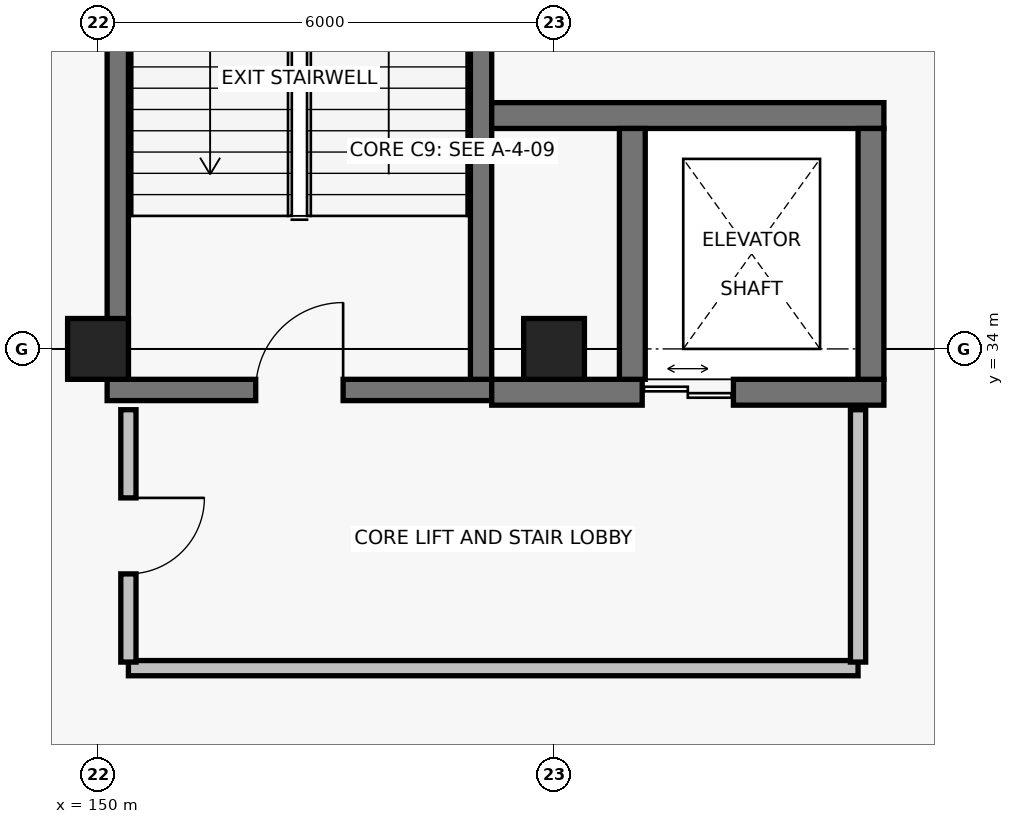
"""IFC4 building model, lengths in metres.
Left out: names, types, materials, properties, quantities, classifications, styles, units other than length and angle.
Written with IfcOpenShell. Run it as: python <this file> out.ifc"""

import sys

from ifc_helpers import new_model, si_unit, direction, frame, frame_2d, origin, origin_2d, place, context, subcontext, project, spatial, rectangle, extrude, element, fill, save


model = new_model("IFC4")
c1 = context("Model", 3, precision=1e-05, world=origin(), true_north=direction((0.0, 1.0)))
c2 = subcontext(c1, "Body", "Model", "MODEL_VIEW")
j1 = project(units=[si_unit("LENGTHUNIT", "METRE"), si_unit("PLANEANGLEUNIT", "RADIAN")], contexts=[c1])
p1 = place(None, origin())
s1 = spatial("IfcSite", under=j1, at=p1, CompositionType="ELEMENT")
p2 = place(p1, origin())
s2 = spatial("IfcBuilding", under=s1, at=p2, CompositionType="ELEMENT")
p3 = place(p2, frame((0.0, 0.0, -4.8)))
s3 = spatial("IfcBuildingStorey", under=s2, at=p3, CompositionType="ELEMENT", Elevation=-4.8)
for number, where, z_axis, x_axis in (
    (1, (150.0, 34.0, 0.0), (0.0, 0.0, 1.0), (1.0, 0.0, 0.0)),
    (2, (156.0, 34.0, 0.0), (0.0, 0.0, 1.0), (1.0, 0.0, 0.0)),
):
    element("IfcColumn", number, at=place(p3, frame(where, z_axis=z_axis, x_axis=x_axis)), inside=s3, PredefinedType="COLUMN", context=c2, shape_type="SweptSolid", body=[
        extrude(rectangle(XDim=0.8, YDim=0.8, at=origin_2d()), origin(), (0.0, 0.0, 1.0), 4.8),
    ])
p4 = place(p3, frame((150.12, 33.46, 0.0), z_axis=(0.0, 0.0, 1.0), x_axis=(1.0, 0.0, 0.0)))
e3 = element("IfcWall", 3, at=p4, inside=s3, PredefinedType="SHEAR", context=c2, shape_type="SweptSolid", body=[
    extrude(rectangle(XDim=5.06, YDim=0.28, at=frame_2d((2.53, 0.0))), origin(), (0.0, 0.0, 1.0), 4.4),
])
p5 = place(p4, frame((1.955, 0.0, 0.0)))
e4 = element("IfcOpeningElement", 4, at=p5, cuts=e3, PredefinedType="OPENING", context=c2, shape_type="SweptSolid", body=[
    extrude(rectangle(XDim=1.15, YDim=2.15, at=frame_2d((0.575, 1.075))), frame((0.0, 0.155, 0.0), z_axis=(0.0, -1.0, 0.0), x_axis=(1.0, 0.0, 0.0)), (0.0, 0.0, 1.0), 0.31),
])
for number, where, z_axis, x_axis in (
    (5, (150.26, 43.4, 0.0), (0.0, 0.0, 1.0), (0.0, -1.0, 0.0)),
    (6, (155.04, 33.6, 0.0), (0.0, 0.0, 1.0), (0.0, 1.0, 0.0)),
):
    element("IfcWall", number, at=place(p3, frame(where, z_axis=z_axis, x_axis=x_axis)), inside=s3, PredefinedType="SHEAR", context=c2, shape_type="SweptSolid", body=[
        extrude(rectangle(XDim=9.8, YDim=0.28, at=frame_2d((4.9, 0.0))), origin(), (0.0, 0.0, 1.0), 4.4),
    ])
p6 = place(p3, frame((155.18, 33.43, 0.0), z_axis=(0.0, 0.0, 1.0), x_axis=(1.0, 0.0, 0.0)))
e7 = element("IfcWall", 7, at=p6, inside=s3, PredefinedType="SHEAR", context=c2, shape_type="SweptSolid", body=[
    extrude(rectangle(XDim=5.16, YDim=0.34, at=frame_2d((2.58, 0.0))), origin(), (0.0, 0.0, 1.0), 4.4),
])
p7 = place(p6, frame((1.98, 0.0, 0.0)))
e8 = element("IfcOpeningElement", 8, at=p7, cuts=e7, PredefinedType="OPENING", context=c2, shape_type="SweptSolid", body=[
    extrude(rectangle(XDim=1.2, YDim=2.2, at=frame_2d((0.6, 1.1))), frame((0.0, 0.185, 0.0), z_axis=(0.0, -1.0, 0.0), x_axis=(1.0, 0.0, 0.0)), (0.0, 0.0, 1.0), 0.37),
])
p8 = place(p3, frame((160.34, 37.07, 0.0), z_axis=(0.0, 0.0, 1.0), x_axis=(-1.0, 0.0, 0.0)))
e9 = element("IfcWall", 9, at=p8, inside=s3, PredefinedType="SHEAR", context=c2, shape_type="SweptSolid", body=[
    extrude(rectangle(XDim=5.16, YDim=0.34, at=frame_2d((2.58, 0.0))), origin(), (0.0, 0.0, 1.0), 4.4),
])
for number, where, z_axis, x_axis in (
    (10, (157.03, 36.9, 0.0), (0.0, 0.0, 1.0), (0.0, -1.0, 0.0)),
    (11, (160.17, 33.6, 0.0), (0.0, 0.0, 1.0), (0.0, 1.0, 0.0)),
):
    element("IfcWall", number, at=place(p3, frame(where, z_axis=z_axis, x_axis=x_axis)), inside=s3, PredefinedType="SHEAR", context=c2, shape_type="SweptSolid", body=[
        extrude(rectangle(XDim=3.3, YDim=0.34, at=frame_2d((1.65, 0.0))), origin(), (0.0, 0.0, 1.0), 4.4),
    ])
p9 = place(p3, frame((150.4, 29.8, 0.0), z_axis=(0.0, 0.0, 1.0), x_axis=(1.0, 0.0, 0.0)))
e12 = element("IfcWall", 12, at=p9, inside=s3, PredefinedType="PARTITIONING", context=c2, shape_type="SweptSolid", body=[
    extrude(rectangle(XDim=9.6, YDim=0.2, at=frame_2d((4.8, 0.0))), origin(), (0.0, 0.0, 1.0), 3.741),
])
p10 = place(p3, frame((150.4, 33.2, 0.0), z_axis=(0.0, 0.0, 1.0), x_axis=(0.0, -1.0, 0.0)))
e13 = element("IfcWall", 13, at=p10, inside=s3, PredefinedType="PARTITIONING", context=c2, shape_type="SweptSolid", body=[
    extrude(rectangle(XDim=3.32, YDim=0.2, at=frame_2d((1.66, 0.0))), origin(), (0.0, 0.0, 1.0), 3.741),
])
p11 = place(p10, frame((1.16, 0.0, 0.0)))
e14 = element("IfcOpeningElement", 14, at=p11, cuts=e13, PredefinedType="OPENING", context=c2, shape_type="SweptSolid", body=[
    extrude(rectangle(XDim=1.0, YDim=2.15, at=frame_2d((0.5, 1.075))), frame((0.0, 0.115, 0.0), z_axis=(0.0, -1.0, 0.0), x_axis=(1.0, 0.0, 0.0)), (0.0, 0.0, 1.0), 0.23),
])
p12 = place(p3, frame((160.0, 29.88, 0.0), z_axis=(0.0, 0.0, 1.0), x_axis=(0.0, 1.0, 0.0)))
e15 = element("IfcWall", 15, at=p12, inside=s3, PredefinedType="PARTITIONING", context=c2, shape_type="SweptSolid", body=[
    extrude(rectangle(XDim=3.32, YDim=0.2, at=frame_2d((1.66, 0.0))), origin(), (0.0, 0.0, 1.0), 4.4),
])
p13 = place(p5, origin())
e16 = element("IfcDoor", 16, at=p13, inside=s3, OperationType="SINGLE_SWING_RIGHT", PredefinedType="DOOR", context=c2, shape_type="SweptSolid", body=[
    extrude(rectangle(XDim=1.15, YDim=2.15, at=frame_2d((0.575, 1.075))), frame((0.0, 0.025, 0.0), z_axis=(0.0, -1.0, 0.0), x_axis=(1.0, 0.0, 0.0)), (0.0, 0.0, 1.0), 0.05),
])
fill(e4, e16)
p14 = place(p7, origin())
e17 = element("IfcDoor", 17, at=p14, inside=s3, OperationType="DOUBLE_DOOR_SLIDING", PredefinedType="DOOR", context=c2, shape_type="SweptSolid", body=[
    extrude(rectangle(XDim=1.2, YDim=2.2, at=frame_2d((0.6, 1.1))), frame((0.0, 0.025, 0.0), z_axis=(0.0, -1.0, 0.0), x_axis=(1.0, 0.0, 0.0)), (0.0, 0.0, 1.0), 0.05),
])
fill(e8, e17)
p15 = place(p11, origin())
e18 = element("IfcDoor", 18, at=p15, inside=s3, OperationType="SINGLE_SWING_LEFT", PredefinedType="DOOR", context=c2, shape_type="SweptSolid", body=[
    extrude(rectangle(XDim=1.0, YDim=2.15, at=frame_2d((0.5, 1.075))), frame((0.0, 0.025, 0.0), z_axis=(0.0, -1.0, 0.0), x_axis=(1.0, 0.0, 0.0)), (0.0, 0.0, 1.0), 0.05),
])
fill(e14, e18)
save(model, sys.argv[1])
